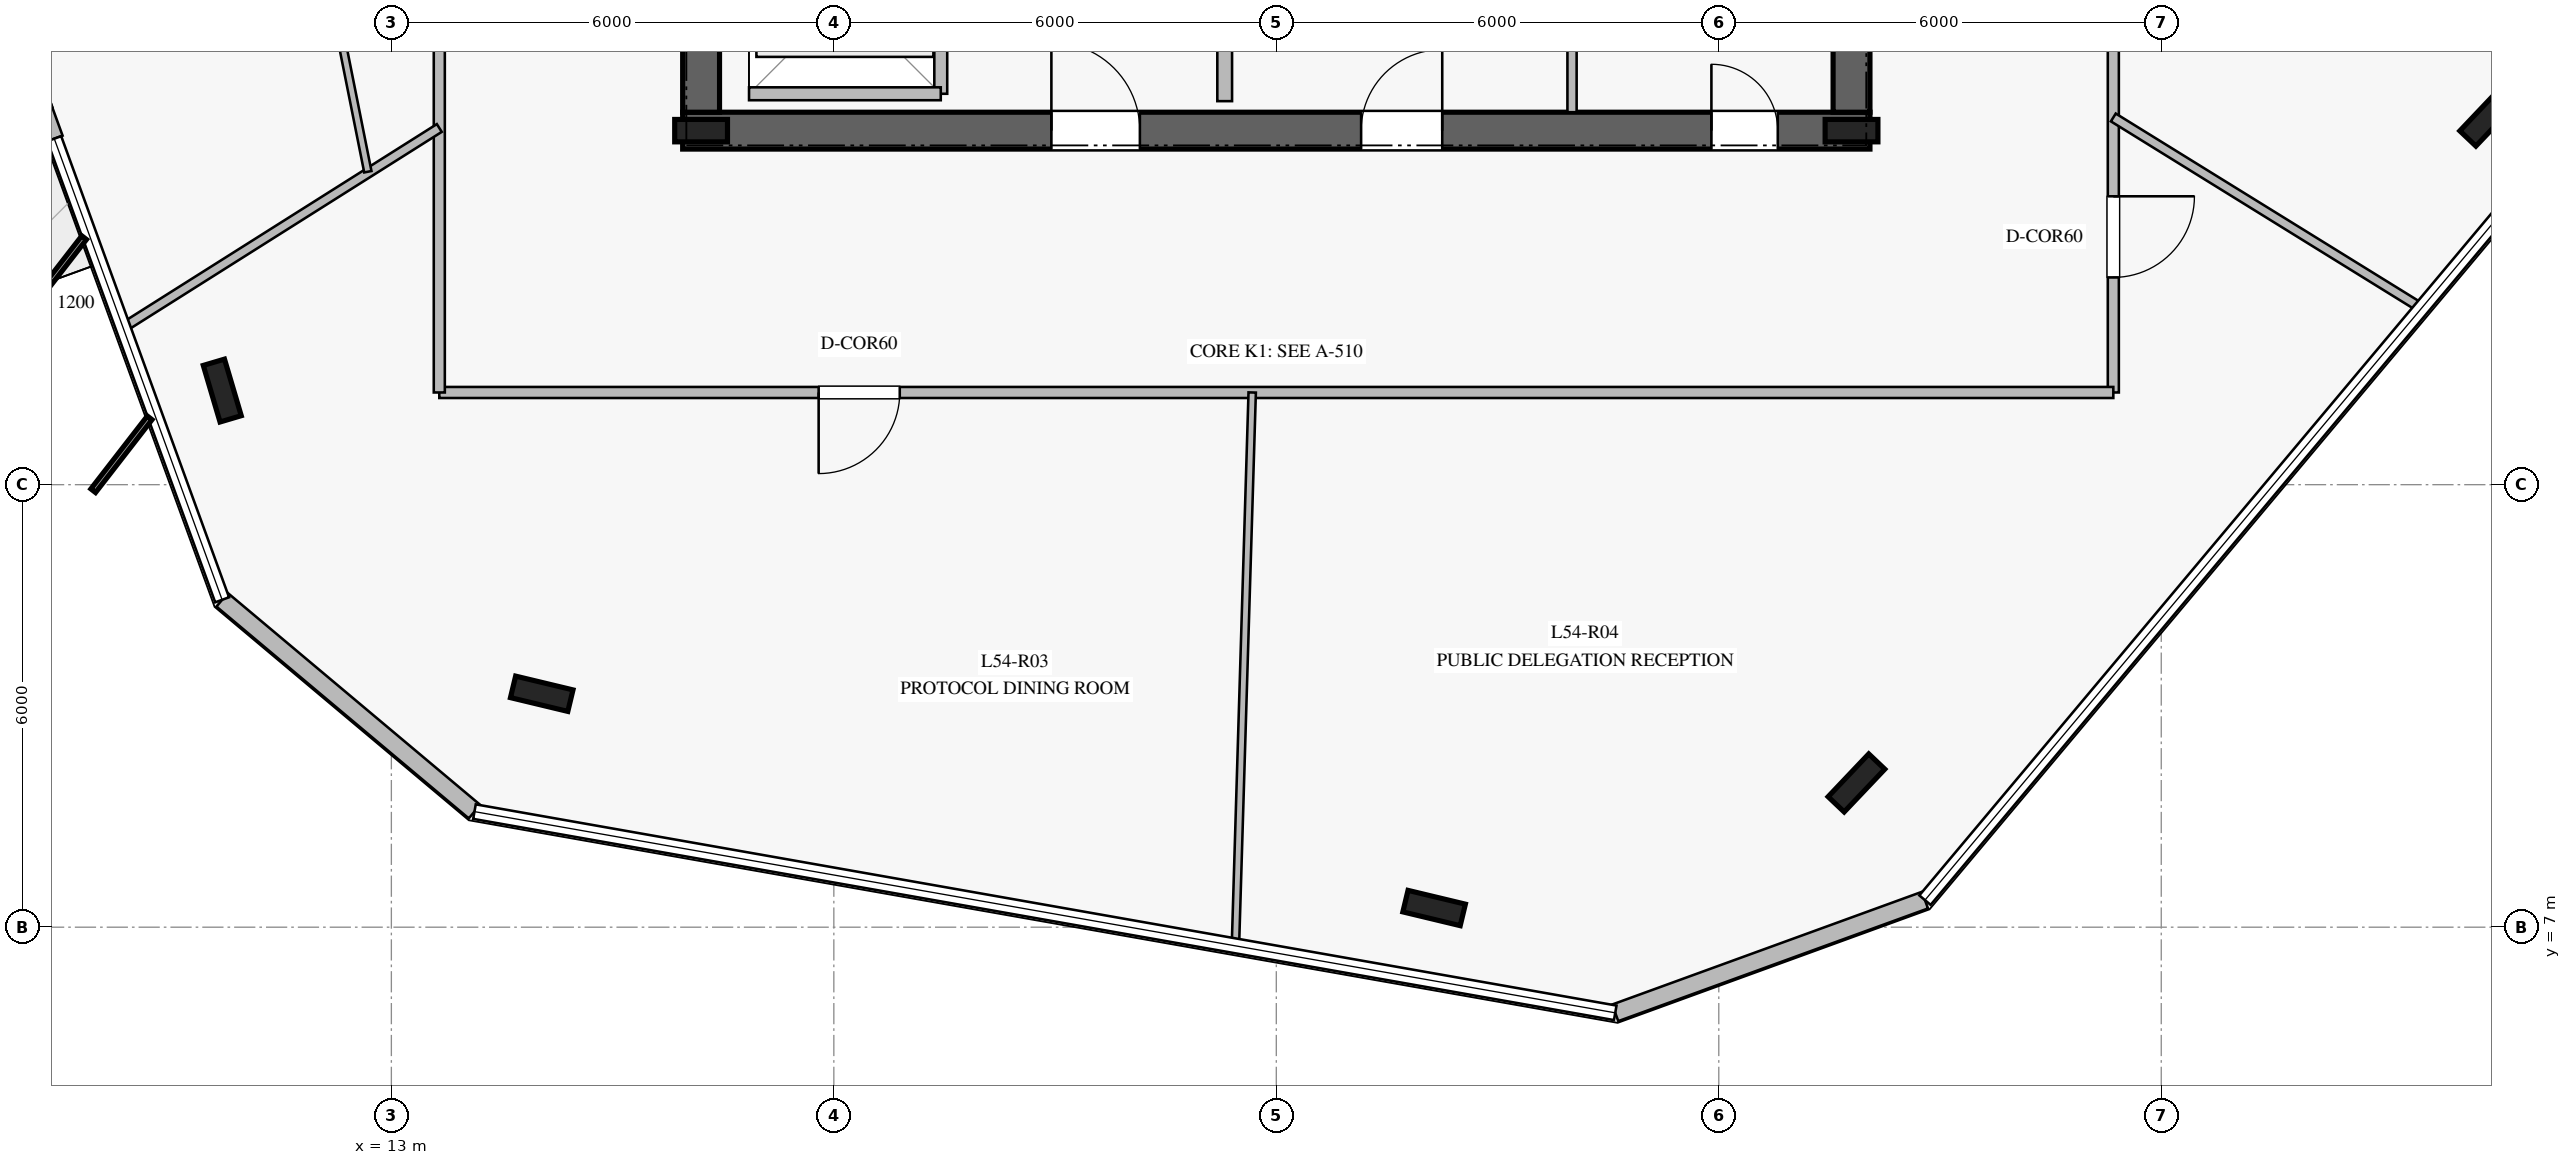
"""IFC4 building model, lengths in metres.
Left out: names, types, materials, properties, quantities, classifications, styles, units other than length and angle.
Written with IfcOpenShell. Run it as: python <this file> out.ifc"""

import sys

from ifc_helpers import new_model, si_unit, direction, frame, frame_2d, origin, origin_2d, place, context, subcontext, project, spatial, rectangle, i_section, extrude, element, fill, save


model = new_model("IFC4")
c1 = context("Model", 3, precision=1e-05, world=origin(), true_north=direction((0.0, 1.0)))
c2 = subcontext(c1, "Body", "Model", "MODEL_VIEW")
j1 = project(units=[si_unit("LENGTHUNIT", "METRE"), si_unit("PLANEANGLEUNIT", "RADIAN")], contexts=[c1])
p1 = place(None, origin())
s1 = spatial("IfcSite", under=j1, at=p1, CompositionType="ELEMENT")
p2 = place(p1, origin())
s2 = spatial("IfcBuilding", under=s1, at=p2, CompositionType="ELEMENT")
p3 = place(p2, frame((0.0, 0.0, 224.8)))
s3 = spatial("IfcBuildingStorey", under=s2, at=p3, CompositionType="ELEMENT", Elevation=224.8)
p4 = place(p3, frame((16.95, 17.8, 0.0), z_axis=(0.0, 0.0, 1.0), x_axis=(1.0, 0.0, 0.0)))
e1 = element("IfcWall", 1, at=p4, inside=s3, PredefinedType="SHEAR", context=c2, shape_type="SweptSolid", body=[
    extrude(rectangle(XDim=16.1, YDim=0.5, at=frame_2d((8.05, 0.0))), origin(), (0.0, 0.0, 1.0), 3.78),
])
p5 = place(p4, frame((5.0, 0.0, 0.0)))
e2 = element("IfcOpeningElement", 2, at=p5, cuts=e1, PredefinedType="OPENING", context=c2, shape_type="SweptSolid", body=[
    extrude(rectangle(XDim=1.2, YDim=2.25, at=frame_2d((0.6, 1.125))), frame((0.0, 0.26, 0.0), z_axis=(0.0, -1.0, 0.0), x_axis=(1.0, 0.0, 0.0)), (0.0, 0.0, 1.0), 0.52),
])
p6 = place(p4, frame((13.95, 0.0, 0.0)))
e3 = element("IfcOpeningElement", 3, at=p6, cuts=e1, PredefinedType="OPENING", context=c2, shape_type="SweptSolid", body=[
    extrude(rectangle(XDim=0.9, YDim=2.1, at=frame_2d((0.45, 1.05))), frame((0.0, 0.26, 0.0), z_axis=(0.0, -1.0, 0.0), x_axis=(1.0, 0.0, 0.0)), (0.0, 0.0, 1.0), 0.52),
])
p7 = place(p4, frame((9.2, 0.0, 0.0)))
e4 = element("IfcOpeningElement", 4, at=p7, cuts=e1, PredefinedType="OPENING", context=c2, shape_type="SweptSolid", body=[
    extrude(rectangle(XDim=1.1, YDim=2.2, at=frame_2d((0.55, 1.1))), frame((0.0, 0.26, 0.0), z_axis=(0.0, -1.0, 0.0), x_axis=(1.0, 0.0, 0.0)), (0.0, 0.0, 1.0), 0.52),
])
p8 = place(p3, frame((17.2, 31.95, 0.0), z_axis=(0.0, 0.0, 1.0), x_axis=(0.0, -1.0, 0.0)))
e5 = element("IfcWall", 5, at=p8, inside=s3, PredefinedType="SHEAR", context=c2, shape_type="SweptSolid", body=[
    extrude(rectangle(XDim=13.9, YDim=0.5, at=frame_2d((6.95, 0.0))), origin(), (0.0, 0.0, 1.0), 3.78),
])
p9 = place(p8, frame((2.1, 0.0, 0.0)))
e6 = element("IfcOpeningElement", 6, at=p9, cuts=e5, PredefinedType="OPENING", context=c2, shape_type="SweptSolid", body=[
    extrude(rectangle(XDim=1.5, YDim=2.2, at=frame_2d((0.75, 1.1))), frame((0.0, 0.26, 0.0), z_axis=(0.0, -1.0, 0.0), x_axis=(1.0, 0.0, 0.0)), (0.0, 0.0, 1.0), 0.52),
])
p10 = place(p3, frame((32.8, 18.05, 0.0), z_axis=(0.0, 0.0, 1.0), x_axis=(0.0, 1.0, 0.0)))
e7 = element("IfcWall", 7, at=p10, inside=s3, PredefinedType="SHEAR", context=c2, shape_type="SweptSolid", body=[
    extrude(rectangle(XDim=13.9, YDim=0.5, at=frame_2d((6.95, 0.0))), origin(), (0.0, 0.0, 1.0), 3.78),
])
for number, where, z_axis, x_axis in (
    (8, (17.2, 17.8, 0.0), (0.0, 0.0, 1.0), (1.0, 0.0, 0.0)),
    (9, (32.8, 17.8, 0.0), (0.0, 0.0, 1.0), (1.0, 0.0, 0.0)),
):
    element("IfcColumn", number, at=place(p3, frame(where, z_axis=z_axis, x_axis=x_axis)), inside=s3, PredefinedType="COLUMN", context=c2, shape_type="SweptSolid", body=[
        extrude(i_section(OverallWidth=0.304, OverallDepth=0.716, WebThickness=0.021, FlangeThickness=0.04, at=origin_2d()), origin(), (0.0, 0.0, 1.0), 4.0),
    ])
for number, where, z_axis, x_axis in (
    (10, (10.707, 14.276, 0.0), (0.0, 0.0, 1.0), (-0.284, 0.959, 0.0)),
    (11, (15.039, 10.165, 0.0), (0.0, 0.0, 1.0), (-0.972, 0.233, 0.0)),
    (12, (27.14, 7.26, 0.0), (0.0, 0.0, 1.0), (-0.972, 0.233, 0.0)),
    (13, (32.867, 8.956, 0.0), (0.0, 0.0, 1.0), (0.688, 0.725, 0.0)),
    (14, (41.433, 17.984, 0.0), (0.0, 0.0, 1.0), (0.688, 0.725, 0.0)),
):
    element("IfcColumn", number, at=place(p3, frame(where, z_axis=z_axis, x_axis=x_axis)), inside=s3, PredefinedType="COLUMN", context=c2, shape_type="SweptSolid", body=[
        extrude(i_section(OverallWidth=0.3, OverallDepth=0.8, WebThickness=0.018, FlangeThickness=0.033, at=origin_2d()), origin(), (0.0, 0.0, 1.0), 4.0),
    ])
p11 = place(p3, frame((7.608, 19.946, 0.0), z_axis=(0.0, 0.0, 1.0), x_axis=(0.342110593602, -0.939659694648, 0.0)))
e15 = element("IfcWall", 15, at=p11, inside=s3, PredefinedType="STANDARD", context=c2, shape_type="SweptSolid", body=[
    extrude(rectangle(XDim=2.4, YDim=0.24, at=frame_2d((1.2, 0.0))), origin(), (0.0, 0.0, 1.0), 3.78),
])
p12 = place(p11, frame((0.4, 0.0, 0.0)))
e16 = element("IfcOpeningElement", 16, at=p12, cuts=e15, PredefinedType="OPENING", context=c2, shape_type="SweptSolid", body=[
    extrude(rectangle(XDim=1.6, YDim=2.25, at=frame_2d((0.8, 1.125))), frame((0.0, 0.13, 0.0), z_axis=(0.0, -1.0, 0.0), x_axis=(1.0, 0.0, 0.0)), (0.0, 0.0, 1.0), 0.26),
])
p13 = place(p3, frame((10.705, 11.439, 0.0), z_axis=(0.0, 0.0, 1.0), x_axis=(0.765958876261, -0.642889570515, 0.0)))
e17 = element("IfcWall", 17, at=p13, inside=s3, PredefinedType="STANDARD", context=c2, shape_type="SweptSolid", body=[
    extrude(rectangle(XDim=4.468, YDim=0.24, at=frame_2d((2.234, 0.0))), origin(), (0.0, 0.0, 1.0), 3.78),
])
p14 = place(p3, frame((29.596, 5.839, 0.0), z_axis=(0.0, 0.0, 1.0), x_axis=(0.939751947736, 0.341857099862, 0.0)))
e18 = element("IfcWall", 18, at=p14, inside=s3, PredefinedType="STANDARD", context=c2, shape_type="SweptSolid", body=[
    extrude(rectangle(XDim=4.469, YDim=0.24, at=frame_2d((2.235, 0.0))), origin(), (0.0, 0.0, 1.0), 3.78),
])
p15 = place(p3, frame((24.3, 18.2, 0.0), z_axis=(0.0, 0.0, 1.0), x_axis=(0.0, 1.0, 0.0)))
e19 = element("IfcWall", 19, at=p15, inside=s3, PredefinedType="PARTITIONING", context=c2, shape_type="SweptSolid", body=[
    extrude(rectangle(XDim=5.15, YDim=0.2, at=frame_2d((2.575, 0.0))), origin(), (0.0, 0.0, 1.0), 3.78),
])
p16 = place(p3, frame((29.01, 18.05, 0.0), z_axis=(0.0, 0.0, 1.0), x_axis=(0.0, 1.0, 0.0)))
e20 = element("IfcWall", 20, at=p16, inside=s3, PredefinedType="PARTITIONING", context=c2, shape_type="SweptSolid", body=[
    extrude(rectangle(XDim=2.5, YDim=0.125, at=frame_2d((1.25, 0.0))), origin(), (0.0, 0.0, 1.0), 3.78),
])
p17 = place(p3, frame((20.45, 18.3, 0.0), z_axis=(0.0, 0.0, 1.0), x_axis=(0.0, 1.0, 0.0)))
e21 = element("IfcWall", 21, at=p17, inside=s3, PredefinedType="PARTITIONING", context=c2, shape_type="SweptSolid", body=[
    extrude(rectangle(XDim=2.6, YDim=0.175, at=frame_2d((1.3, 0.0))), origin(), (0.0, 0.0, 1.0), 3.78),
])
p18 = place(p17, frame((0.7, 0.0, 0.0)))
e22 = element("IfcOpeningElement", 22, at=p18, cuts=e21, PredefinedType="OPENING", context=c2, shape_type="SweptSolid", body=[
    extrude(rectangle(XDim=1.2, YDim=2.2, at=frame_2d((0.6, 1.1))), frame((0.0, 0.098, 0.0), z_axis=(0.0, -1.0, 0.0), x_axis=(1.0, 0.0, 0.0)), (0.0, 0.0, 1.0), 0.195),
])
p19 = place(p3, frame((17.85, 18.3, 0.0), z_axis=(0.0, 0.0, 1.0), x_axis=(1.0, 0.0, 0.0)))
e23 = element("IfcWall", 23, at=p19, inside=s3, PredefinedType="PARTITIONING", context=c2, shape_type="SweptSolid", body=[
    extrude(rectangle(XDim=2.6, YDim=0.175, at=frame_2d((1.3, 0.0))), origin(), (0.0, 0.0, 1.0), 3.78),
])
p20 = place(p3, frame((36.35, 35.75, 0.0), z_axis=(0.0, 0.0, 1.0), x_axis=(0.0, -1.0, 0.0)))
e24 = element("IfcWall", 24, at=p20, inside=s3, PredefinedType="PARTITIONING", context=c2, shape_type="SweptSolid", body=[
    extrude(rectangle(XDim=21.5, YDim=0.15, at=frame_2d((10.75, 0.0))), origin(), (0.0, 0.0, 1.0), 3.28),
])
p21 = place(p20, frame((18.84, 0.0, 0.0)))
e25 = element("IfcOpeningElement", 25, at=p21, cuts=e24, PredefinedType="OPENING", context=c2, shape_type="SweptSolid", body=[
    extrude(rectangle(XDim=1.1, YDim=2.2, at=frame_2d((0.55, 1.1))), frame((0.0, 0.085, 0.0), z_axis=(0.0, -1.0, 0.0), x_axis=(1.0, 0.0, 0.0)), (0.0, 0.0, 1.0), 0.17),
])
p22 = place(p20, frame((10.665, 0.0, 0.0)))
e26 = element("IfcOpeningElement", 26, at=p22, cuts=e24, PredefinedType="OPENING", context=c2, shape_type="SweptSolid", body=[
    extrude(rectangle(XDim=1.1, YDim=2.2, at=frame_2d((0.55, 1.1))), frame((0.0, 0.085, 0.0), z_axis=(0.0, -1.0, 0.0), x_axis=(1.0, 0.0, 0.0)), (0.0, 0.0, 1.0), 0.17),
])
p23 = place(p3, frame((36.35, 14.25, 0.0), z_axis=(0.0, 0.0, 1.0), x_axis=(-1.0, 0.0, 0.0)))
e27 = element("IfcWall", 27, at=p23, inside=s3, PredefinedType="PARTITIONING", context=c2, shape_type="SweptSolid", body=[
    extrude(rectangle(XDim=22.7, YDim=0.15, at=frame_2d((11.35, 0.0))), origin(), (0.0, 0.0, 1.0), 3.05),
])
p24 = place(p23, frame((16.456, 0.0, 0.0)))
e28 = element("IfcOpeningElement", 28, at=p24, cuts=e27, PredefinedType="OPENING", context=c2, shape_type="SweptSolid", body=[
    extrude(rectangle(XDim=1.1, YDim=2.2, at=frame_2d((0.55, 1.1))), frame((0.0, 0.085, 0.0), z_axis=(0.0, -1.0, 0.0), x_axis=(1.0, 0.0, 0.0)), (0.0, 0.0, 1.0), 0.17),
])
p25 = place(p3, frame((13.65, 14.25, 0.0), z_axis=(0.0, 0.0, 1.0), x_axis=(0.0, 1.0, 0.0)))
e29 = element("IfcWall", 29, at=p25, inside=s3, PredefinedType="PARTITIONING", context=c2, shape_type="SweptSolid", body=[
    extrude(rectangle(XDim=21.5, YDim=0.15, at=frame_2d((10.75, 0.0))), origin(), (0.0, 0.0, 1.0), 3.28),
])
p26 = place(p25, frame((8.285, 0.0, 0.0)))
e30 = element("IfcOpeningElement", 30, at=p26, cuts=e29, PredefinedType="OPENING", context=c2, shape_type="SweptSolid", body=[
    extrude(rectangle(XDim=1.1, YDim=2.2, at=frame_2d((0.55, 1.1))), frame((0.0, 0.085, 0.0), z_axis=(0.0, -1.0, 0.0), x_axis=(1.0, 0.0, 0.0)), (0.0, 0.0, 1.0), 0.17),
])
p27 = place(p3, frame((13.65, 17.836, 0.0), z_axis=(0.0, 0.0, 1.0), x_axis=(-0.845607107165, -0.533805788946, 0.0)))
e31 = element("IfcWall", 31, at=p27, inside=s3, PredefinedType="PARTITIONING", context=c2, shape_type="SweptSolid", body=[
    extrude(rectangle(XDim=5.054, YDim=0.125, at=frame_2d((2.527, 0.0))), origin(), (0.0, 0.0, 1.0), 3.18),
])
p28 = place(p3, frame((24.673, 14.25, 0.0), z_axis=(0.0, 0.0, 1.0), x_axis=(-0.030315772929, -0.999540371327, 0.0)))
e32 = element("IfcWall", 32, at=p28, inside=s3, PredefinedType="MOVABLE", context=c2, shape_type="SweptSolid", body=[
    extrude(rectangle(XDim=7.49, YDim=0.1, at=frame_2d((3.745, 0.0))), origin(), (0.0, 0.0, 1.0), 3.05),
])
p29 = place(p3, frame((36.35, 17.979, 0.0), z_axis=(0.0, 0.0, 1.0), x_axis=(0.850384110208, -0.526162394234, 0.0)))
e33 = element("IfcWall", 33, at=p29, inside=s3, PredefinedType="PARTITIONING", context=c2, shape_type="SweptSolid", body=[
    extrude(rectangle(XDim=4.897, YDim=0.125, at=frame_2d((2.449, 0.0))), origin(), (0.0, 0.0, 1.0), 3.18),
])
p30 = place(p3, frame((10.261, 29.354, 0.0), z_axis=(0.0, 0.0, 1.0), x_axis=(0.195937462268, -0.980616393336, 0.0)))
e34 = element("IfcWall", 34, at=p30, inside=s3, PredefinedType="MOVABLE", context=c2, shape_type="SweptSolid", body=[
    extrude(rectangle(XDim=12.351, YDim=0.1, at=frame_2d((6.175, 0.0))), origin(), (0.0, 0.0, 1.0), 3.28),
])
p31 = place(p30, frame((5.675, 0.0, 0.0)))
e35 = element("IfcOpeningElement", 35, at=p31, cuts=e34, PredefinedType="OPENING", context=c2, shape_type="SweptSolid", body=[
    extrude(rectangle(XDim=1.0, YDim=2.15, at=frame_2d((0.5, 1.075))), frame((0.0, 0.06, 0.0), z_axis=(0.0, -1.0, 0.0), x_axis=(1.0, 0.0, 0.0)), (0.0, 0.0, 1.0), 0.12),
])
p32 = place(p5, origin())
e36 = element("IfcDoor", 36, at=p32, inside=s3, OperationType="SINGLE_SWING_LEFT", PredefinedType="DOOR", context=c2, shape_type="SweptSolid", body=[
    extrude(rectangle(XDim=1.2, YDim=2.25, at=frame_2d((0.6, 1.125))), frame((0.0, 0.025, 0.0), z_axis=(0.0, -1.0, 0.0), x_axis=(1.0, 0.0, 0.0)), (0.0, 0.0, 1.0), 0.05),
])
fill(e2, e36)
p33 = place(p6, origin())
e37 = element("IfcDoor", 37, at=p33, inside=s3, OperationType="SINGLE_SWING_LEFT", PredefinedType="DOOR", context=c2, shape_type="SweptSolid", body=[
    extrude(rectangle(XDim=0.9, YDim=2.1, at=frame_2d((0.45, 1.05))), frame((0.0, 0.025, 0.0), z_axis=(0.0, -1.0, 0.0), x_axis=(1.0, 0.0, 0.0)), (0.0, 0.0, 1.0), 0.05),
])
fill(e3, e37)
p34 = place(p7, origin())
e38 = element("IfcDoor", 38, at=p34, inside=s3, OperationType="SINGLE_SWING_RIGHT", PredefinedType="DOOR", context=c2, shape_type="SweptSolid", body=[
    extrude(rectangle(XDim=1.1, YDim=2.2, at=frame_2d((0.55, 1.1))), frame((0.0, 0.025, 0.0), z_axis=(0.0, -1.0, 0.0), x_axis=(1.0, 0.0, 0.0)), (0.0, 0.0, 1.0), 0.05),
])
fill(e4, e38)
p35 = place(p24, origin())
e39 = element("IfcDoor", 39, at=p35, inside=s3, OperationType="SINGLE_SWING_RIGHT", PredefinedType="DOOR", context=c2, shape_type="SweptSolid", body=[
    extrude(rectangle(XDim=1.1, YDim=2.2, at=frame_2d((0.55, 1.1))), frame((0.0, 0.025, 0.0), z_axis=(0.0, -1.0, 0.0), x_axis=(1.0, 0.0, 0.0)), (0.0, 0.0, 1.0), 0.05),
])
fill(e28, e39)
p36 = place(p21, origin())
e40 = element("IfcDoor", 40, at=p36, inside=s3, OperationType="SINGLE_SWING_LEFT", PredefinedType="DOOR", context=c2, shape_type="SweptSolid", body=[
    extrude(rectangle(XDim=1.1, YDim=2.2, at=frame_2d((0.55, 1.1))), frame((0.0, 0.025, 0.0), z_axis=(0.0, -1.0, 0.0), x_axis=(1.0, 0.0, 0.0)), (0.0, 0.0, 1.0), 0.05),
])
fill(e25, e40)
save(model, sys.argv[1])
